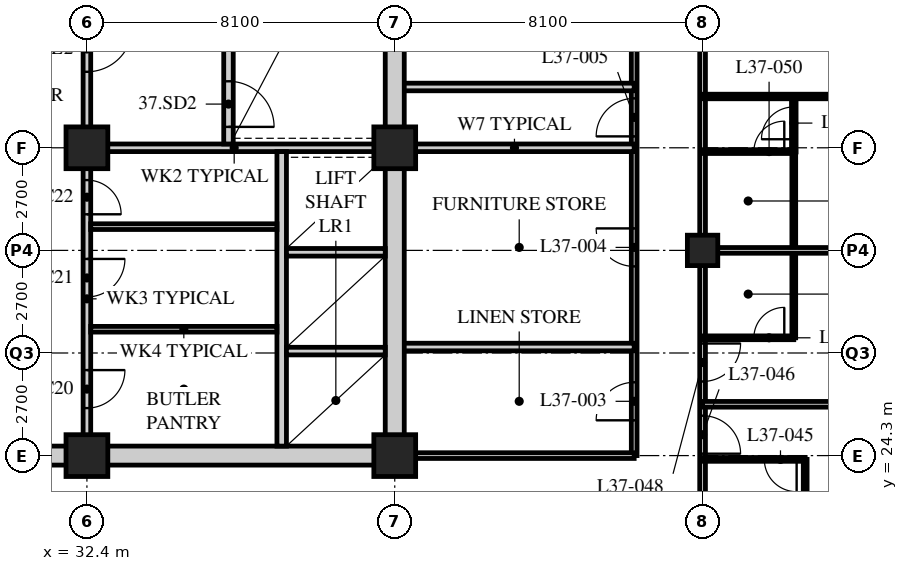
"""IFC4 building model, lengths in metres.
Left out: names, types, materials, properties, quantities, classifications, styles, units other than length and angle.
Written with IfcOpenShell. Run it as: python <this file> out.ifc"""

import sys

from ifc_helpers import new_model, si_unit, direction, frame, frame_2d, origin, origin_2d, place, context, subcontext, project, spatial, rectangle, hollow_rectangle, extrude, element, fill, save


model = new_model("IFC4")
c1 = context("Model", 3, precision=1e-05, world=origin(), true_north=direction((0.0, 1.0)))
c2 = subcontext(c1, "Body", "Model", "MODEL_VIEW")
j1 = project(units=[si_unit("LENGTHUNIT", "METRE"), si_unit("PLANEANGLEUNIT", "RADIAN")], contexts=[c1])
p1 = place(None, origin())
s1 = spatial("IfcSite", under=j1, at=p1, CompositionType="ELEMENT")
p2 = place(p1, origin())
s2 = spatial("IfcBuilding", under=s1, at=p2, CompositionType="ELEMENT")
p3 = place(p2, frame((0.0, 0.0, 144.2)))
s3 = spatial("IfcBuildingStorey", under=s2, at=p3, CompositionType="ELEMENT", Elevation=144.2)
for number, where, z_axis, x_axis in (
    (1, (32.4, 24.3, 0.0), (0.0, 0.0, 1.0), (1.0, 0.0, 0.0)),
    (2, (32.4, 32.4, 0.0), (0.0, 0.0, 1.0), (1.0, 0.0, 0.0)),
    (3, (40.5, 24.3, 0.0), (0.0, 0.0, 1.0), (1.0, 0.0, 0.0)),
    (4, (40.5, 32.4, 0.0), (0.0, 0.0, 1.0), (1.0, 0.0, 0.0)),
):
    element("IfcColumn", number, at=place(p3, frame(where, z_axis=z_axis, x_axis=x_axis)), inside=s3, PredefinedType="COLUMN", context=c2, shape_type="SweptSolid", body=[
        extrude(hollow_rectangle(XDim=1.1, YDim=1.1, WallThickness=0.1, at=origin_2d()), origin(), (0.0, 0.0, 1.0), 3.4),
    ])
p4 = place(p3, frame((48.6, 29.7, 0.0), z_axis=(0.0, 0.0, 1.0), x_axis=(1.0, 0.0, 0.0)))
e5 = element("IfcColumn", 5, at=p4, inside=s3, PredefinedType="COLUMN", context=c2, shape_type="SweptSolid", body=[
    extrude(hollow_rectangle(XDim=0.8, YDim=0.8, WallThickness=0.08, at=origin_2d()), origin(), (0.0, 0.0, 1.0), 3.4),
])
p5 = place(p3, frame((48.6, 21.6, 0.0), z_axis=(0.0, 0.0, 1.0), x_axis=(0.0, 1.0, 0.0)))
e6 = element("IfcWall", 6, at=p5, inside=s3, PredefinedType="PARTITIONING", context=c2, shape_type="SweptSolid", body=[
    extrude(rectangle(XDim=24.3, YDim=0.15, at=frame_2d((12.15, 0.0))), origin(), (0.0, 0.0, 1.0), 2.42),
])
p6 = place(p5, frame((2.75, 0.0, 0.0)))
e7 = element("IfcOpeningElement", 7, at=p6, cuts=e6, PredefinedType="OPENING", context=c2, shape_type="SweptSolid", body=[
    extrude(rectangle(XDim=1.0, YDim=2.1, at=frame_2d((0.5, 1.05))), frame((0.0, 0.085, 0.0), z_axis=(0.0, -1.0, 0.0), x_axis=(1.0, 0.0, 0.0)), (0.0, 0.0, 1.0), 0.17),
])
p7 = place(p5, frame((4.65, 0.0, 0.0)))
e8 = element("IfcOpeningElement", 8, at=p7, cuts=e6, PredefinedType="OPENING", context=c2, shape_type="SweptSolid", body=[
    extrude(rectangle(XDim=1.0, YDim=2.1, at=frame_2d((0.5, 1.05))), frame((0.0, 0.085, 0.0), z_axis=(0.0, -1.0, 0.0), x_axis=(1.0, 0.0, 0.0)), (0.0, 0.0, 1.0), 0.17),
])
p8 = place(p5, frame((13.675, 0.0, 0.0)))
e9 = element("IfcOpeningElement", 9, at=p8, cuts=e6, PredefinedType="OPENING", context=c2, shape_type="SweptSolid", body=[
    extrude(rectangle(XDim=1.0, YDim=2.1, at=frame_2d((0.5, 1.05))), frame((0.0, 0.085, 0.0), z_axis=(0.0, -1.0, 0.0), x_axis=(1.0, 0.0, 0.0)), (0.0, 0.0, 1.0), 0.17),
])
p9 = place(p5, frame((20.85, 0.0, 0.0)))
e10 = element("IfcOpeningElement", 10, at=p9, cuts=e6, PredefinedType="OPENING", context=c2, shape_type="SweptSolid", body=[
    extrude(rectangle(XDim=1.0, YDim=2.1, at=frame_2d((0.5, 1.05))), frame((0.0, 0.085, 0.0), z_axis=(0.0, -1.0, 0.0), x_axis=(1.0, 0.0, 0.0)), (0.0, 0.0, 1.0), 0.17),
])
p10 = place(p3, frame((46.8, 24.3, 0.0), z_axis=(0.0, 0.0, 1.0), x_axis=(0.0, 1.0, 0.0)))
e11 = element("IfcWall", 11, at=p10, inside=s3, PredefinedType="PARTITIONING", context=c2, shape_type="SweptSolid", body=[
    extrude(rectangle(XDim=19.8, YDim=0.15, at=frame_2d((9.9, 0.0))), origin(), (0.0, 0.0, 1.0), 3.19),
])
p11 = place(p10, frame((0.929, 0.0, 0.0)))
e12 = element("IfcOpeningElement", 12, at=p11, cuts=e11, PredefinedType="OPENING", context=c2, shape_type="SweptSolid", body=[
    extrude(rectangle(XDim=1.0, YDim=2.1, at=frame_2d((0.5, 1.05))), frame((0.0, 0.085, 0.0), z_axis=(0.0, -1.0, 0.0), x_axis=(1.0, 0.0, 0.0)), (0.0, 0.0, 1.0), 0.17),
])
p12 = place(p10, frame((4.979, 0.0, 0.0)))
e13 = element("IfcOpeningElement", 13, at=p12, cuts=e11, PredefinedType="OPENING", context=c2, shape_type="SweptSolid", body=[
    extrude(rectangle(XDim=1.0, YDim=2.1, at=frame_2d((0.5, 1.05))), frame((0.0, 0.085, 0.0), z_axis=(0.0, -1.0, 0.0), x_axis=(1.0, 0.0, 0.0)), (0.0, 0.0, 1.0), 0.17),
])
p13 = place(p10, frame((8.4, 0.0, 0.0)))
e14 = element("IfcOpeningElement", 14, at=p13, cuts=e11, PredefinedType="OPENING", context=c2, shape_type="SweptSolid", body=[
    extrude(rectangle(XDim=1.0, YDim=2.1, at=frame_2d((0.5, 1.05))), frame((0.0, 0.085, 0.0), z_axis=(0.0, -1.0, 0.0), x_axis=(1.0, 0.0, 0.0)), (0.0, 0.0, 1.0), 0.17),
])
p14 = place(p10, frame((12.45, 0.0, 0.0)))
e15 = element("IfcOpeningElement", 15, at=p14, cuts=e11, PredefinedType="OPENING", context=c2, shape_type="SweptSolid", body=[
    extrude(rectangle(XDim=1.0, YDim=2.1, at=frame_2d((0.5, 1.05))), frame((0.0, 0.085, 0.0), z_axis=(0.0, -1.0, 0.0), x_axis=(1.0, 0.0, 0.0)), (0.0, 0.0, 1.0), 0.17),
])
p15 = place(p3, frame((40.7, 24.3, 0.0), z_axis=(0.0, 0.0, 1.0), x_axis=(1.0, 0.0, 0.0)))
e16 = element("IfcWall", 16, at=p15, inside=s3, PredefinedType="PARTITIONING", context=c2, shape_type="SweptSolid", body=[
    extrude(rectangle(XDim=6.1, YDim=0.15, at=frame_2d((3.05, 0.0))), origin(), (0.0, 0.0, 1.0), 3.19),
])
for number, where, z_axis, x_axis in (
    (17, (40.5, 32.4, 0.0), (0.0, 0.0, 1.0), (1.0, 0.0, 0.0)),
    (18, (46.8, 27.157, 0.0), (0.0, 0.0, 1.0), (-1.0, 0.0, 0.0)),
    (19, (46.8, 34.0, 0.0), (0.0, 0.0, 1.0), (-1.0, 0.0, 0.0)),
):
    element("IfcWall", number, at=place(p3, frame(where, z_axis=z_axis, x_axis=x_axis)), inside=s3, PredefinedType="SOLIDWALL", context=c2, shape_type="SweptSolid", body=[
        extrude(rectangle(XDim=6.3, YDim=0.2, at=frame_2d((3.15, 0.0))), origin(), (0.0, 0.0, 1.0), 3.19),
    ])
p16 = place(p3, frame((51.3, 21.6, 0.0), z_axis=(0.0, 0.0, 1.0), x_axis=(0.0, 1.0, 0.0)))
e20 = element("IfcWall", 20, at=p16, inside=s3, PredefinedType="PARTITIONING", context=c2, shape_type="SweptSolid", body=[
    extrude(rectangle(XDim=2.6, YDim=0.1, at=frame_2d((1.3, 0.0))), origin(), (0.0, 0.0, 1.0), 3.19),
])
p17 = place(p3, frame((48.6, 24.2, 0.0), z_axis=(0.0, 0.0, 1.0), x_axis=(1.0, 0.0, 0.0)))
e21 = element("IfcWall", 21, at=p17, inside=s3, PredefinedType="PARTITIONING", context=c2, shape_type="SweptSolid", body=[
    extrude(rectangle(XDim=2.7, YDim=0.1, at=frame_2d((1.35, 0.0))), origin(), (0.0, 0.0, 1.0), 3.19),
])
p18 = place(p17, frame((1.625, 0.0, 0.0)))
e22 = element("IfcOpeningElement", 22, at=p18, cuts=e21, PredefinedType="OPENING", context=c2, shape_type="SweptSolid", body=[
    extrude(rectangle(XDim=0.85, YDim=2.1, at=frame_2d((0.425, 1.05))), frame((0.0, 0.06, 0.0), z_axis=(0.0, -1.0, 0.0), x_axis=(1.0, 0.0, 0.0)), (0.0, 0.0, 1.0), 0.12),
])
p19 = place(p3, frame((48.6, 25.65, 0.0), z_axis=(0.0, 0.0, 1.0), x_axis=(1.0, 0.0, 0.0)))
e23 = element("IfcWall", 23, at=p19, inside=s3, PredefinedType="PARTITIONING", context=c2, shape_type="SweptSolid", body=[
    extrude(rectangle(XDim=7.8, YDim=0.15, at=frame_2d((3.9, 0.0))), origin(), (0.0, 0.0, 1.0), 3.19),
])
p20 = place(p3, frame((51.0, 27.4, 0.0), z_axis=(0.0, 0.0, 1.0), x_axis=(0.0, 1.0, 0.0)))
e24 = element("IfcWall", 24, at=p20, inside=s3, PredefinedType="PARTITIONING", context=c2, shape_type="SweptSolid", body=[
    extrude(rectangle(XDim=4.9, YDim=0.1, at=frame_2d((2.45, 0.0))), origin(), (0.0, 0.0, 1.0), 3.19),
])
p21 = place(p3, frame((48.6, 27.4, 0.0), z_axis=(0.0, 0.0, 1.0), x_axis=(1.0, 0.0, 0.0)))
e25 = element("IfcWall", 25, at=p21, inside=s3, PredefinedType="PARTITIONING", context=c2, shape_type="SweptSolid", body=[
    extrude(rectangle(XDim=2.4, YDim=0.1, at=frame_2d((1.2, 0.0))), origin(), (0.0, 0.0, 1.0), 3.19),
])
p22 = place(p21, frame((1.35, 0.0, 0.0)))
e26 = element("IfcOpeningElement", 26, at=p22, cuts=e25, PredefinedType="OPENING", context=c2, shape_type="SweptSolid", body=[
    extrude(rectangle(XDim=0.8, YDim=2.1, at=frame_2d((0.4, 1.05))), frame((0.0, 0.06, 0.0), z_axis=(0.0, -1.0, 0.0), x_axis=(1.0, 0.0, 0.0)), (0.0, 0.0, 1.0), 0.12),
])
p23 = place(p3, frame((48.6, 29.7, 0.0), z_axis=(0.0, 0.0, 1.0), x_axis=(1.0, 0.0, 0.0)))
e27 = element("IfcWall", 27, at=p23, inside=s3, PredefinedType="PARTITIONING", context=c2, shape_type="SweptSolid", body=[
    extrude(rectangle(XDim=7.8, YDim=0.15, at=frame_2d((3.9, 0.0))), origin(), (0.0, 0.0, 1.0), 2.42),
])
p24 = place(p3, frame((48.6, 32.3, 0.0), z_axis=(0.0, 0.0, 1.0), x_axis=(1.0, 0.0, 0.0)))
e28 = element("IfcWall", 28, at=p24, inside=s3, PredefinedType="PARTITIONING", context=c2, shape_type="SweptSolid", body=[
    extrude(rectangle(XDim=2.4, YDim=0.1, at=frame_2d((1.2, 0.0))), origin(), (0.0, 0.0, 1.0), 3.19),
])
p25 = place(p24, frame((1.35, 0.0, 0.0)))
e29 = element("IfcOpeningElement", 29, at=p25, cuts=e28, PredefinedType="OPENING", context=c2, shape_type="SweptSolid", body=[
    extrude(rectangle(XDim=0.8, YDim=2.1, at=frame_2d((0.4, 1.05))), frame((0.0, 0.06, 0.0), z_axis=(0.0, -1.0, 0.0), x_axis=(1.0, 0.0, 0.0)), (0.0, 0.0, 1.0), 0.12),
])
p26 = place(p3, frame((48.6, 33.75, 0.0), z_axis=(0.0, 0.0, 1.0), x_axis=(1.0, 0.0, 0.0)))
e30 = element("IfcWall", 30, at=p26, inside=s3, PredefinedType="PARTITIONING", context=c2, shape_type="SweptSolid", body=[
    extrude(rectangle(XDim=7.8, YDim=0.12, at=frame_2d((3.9, 0.0))), origin(), (0.0, 0.0, 1.0), 3.19),
])
p27 = place(p26, frame((4.825, 0.0, 0.0)))
e31 = element("IfcOpeningElement", 31, at=p27, cuts=e30, PredefinedType="OPENING", context=c2, shape_type="SweptSolid", body=[
    extrude(rectangle(XDim=0.85, YDim=2.1, at=frame_2d((0.425, 1.05))), frame((0.0, 0.07, 0.0), z_axis=(0.0, -1.0, 0.0), x_axis=(1.0, 0.0, 0.0)), (0.0, 0.0, 1.0), 0.14),
])
p28 = place(p3, frame((51.0, 33.75, 0.0), z_axis=(0.0, 0.0, 1.0), x_axis=(0.0, -1.0, 0.0)))
e32 = element("IfcWall", 32, at=p28, inside=s3, PredefinedType="PARTITIONING", context=c2, shape_type="SweptSolid", body=[
    extrude(rectangle(XDim=1.46, YDim=0.12, at=frame_2d((0.73, 0.0))), origin(), (0.0, 0.0, 1.0), 3.19),
])
p29 = place(p28, frame((0.275, 0.0, 0.0)))
e33 = element("IfcOpeningElement", 33, at=p29, cuts=e32, PredefinedType="OPENING", context=c2, shape_type="SweptSolid", body=[
    extrude(rectangle(XDim=0.85, YDim=2.1, at=frame_2d((0.425, 1.05))), frame((0.0, 0.07, 0.0), z_axis=(0.0, -1.0, 0.0), x_axis=(1.0, 0.0, 0.0)), (0.0, 0.0, 1.0), 0.14),
])
p30 = place(p3, frame((15.95, 24.3, 0.0), z_axis=(0.0, 0.0, 1.0), x_axis=(1.0, 0.0, 0.0)))
e34 = element("IfcWall", 34, at=p30, inside=s3, PredefinedType="SOLIDWALL", context=c2, shape_type="SweptSolid", body=[
    extrude(rectangle(XDim=24.8, YDim=0.5, at=frame_2d((12.4, 0.0))), origin(), (0.0, 0.0, 1.0), 2.42),
])
p31 = place(p30, frame((11.5, 0.0, 0.0)))
e35 = element("IfcOpeningElement", 35, at=p31, cuts=e34, PredefinedType="OPENING", context=c2, shape_type="SweptSolid", body=[
    extrude(rectangle(XDim=1.8, YDim=2.4, at=frame_2d((0.9, 1.2))), frame((0.0, 0.26, 0.0), z_axis=(0.0, -1.0, 0.0), x_axis=(1.0, 0.0, 0.0)), (0.0, 0.0, 1.0), 0.52),
])
p32 = place(p3, frame((40.5, 24.55, 0.0), z_axis=(0.0, 0.0, 1.0), x_axis=(0.0, 1.0, 0.0)))
e36 = element("IfcWall", 36, at=p32, inside=s3, PredefinedType="SOLIDWALL", context=c2, shape_type="SweptSolid", body=[
    extrude(rectangle(XDim=15.7, YDim=0.5, at=frame_2d((7.85, 0.0))), origin(), (0.0, 0.0, 1.0), 2.42),
])
p33 = place(p3, frame((32.3, 32.4, 0.0), z_axis=(0.0, 0.0, 1.0), x_axis=(1.0, 0.0, 0.0)))
e37 = element("IfcWall", 37, at=p33, inside=s3, PredefinedType="SOLIDWALL", context=c2, shape_type="SweptSolid", body=[
    extrude(rectangle(XDim=7.95, YDim=0.2, at=frame_2d((3.975, 0.0))), origin(), (0.0, 0.0, 1.0), 2.578),
])
p34 = place(p3, frame((32.4, 32.5, 0.0), z_axis=(0.0, 0.0, 1.0), x_axis=(0.0, 1.0, 0.0)))
e38 = element("IfcWall", 38, at=p34, inside=s3, PredefinedType="SOLIDWALL", context=c2, shape_type="SweptSolid", body=[
    extrude(rectangle(XDim=7.75, YDim=0.2, at=frame_2d((3.875, 0.0))), origin(), (0.0, 0.0, 1.0), 2.578),
])
p35 = place(p34, frame((1.9, 0.0, 0.0)))
e39 = element("IfcOpeningElement", 39, at=p35, cuts=e38, PredefinedType="OPENING", context=c2, shape_type="SweptSolid", body=[
    extrude(rectangle(XDim=1.2, YDim=2.1, at=frame_2d((0.6, 1.05))), frame((0.0, 0.11, 0.0), z_axis=(0.0, -1.0, 0.0), x_axis=(1.0, 0.0, 0.0)), (0.0, 0.0, 1.0), 0.22),
])
p36 = place(p3, frame((37.525, 24.55, 0.0), z_axis=(0.0, 0.0, 1.0), x_axis=(0.0, 1.0, 0.0)))
e40 = element("IfcWall", 40, at=p36, inside=s3, PredefinedType="SOLIDWALL", context=c2, shape_type="SweptSolid", body=[
    extrude(rectangle(XDim=7.75, YDim=0.25, at=frame_2d((3.875, 0.0))), origin(), (0.0, 0.0, 1.0), 3.19),
])
for number, where, z_axis, x_axis in (
    (41, (37.65, 27.05, 0.0), (0.0, 0.0, 1.0), (1.0, 0.0, 0.0)),
    (42, (37.65, 29.65, 0.0), (0.0, 0.0, 1.0), (1.0, 0.0, 0.0)),
):
    element("IfcWall", number, at=place(p3, frame(where, z_axis=z_axis, x_axis=x_axis)), inside=s3, PredefinedType="SOLIDWALL", context=c2, shape_type="SweptSolid", body=[
        extrude(rectangle(XDim=2.6, YDim=0.2, at=frame_2d((1.3, 0.0))), origin(), (0.0, 0.0, 1.0), 3.19),
    ])
p37 = place(p3, frame((36.125, 32.5, 0.0), z_axis=(0.0, 0.0, 1.0), x_axis=(0.0, 1.0, 0.0)))
e43 = element("IfcWall", 43, at=p37, inside=s3, PredefinedType="SOLIDWALL", context=c2, shape_type="SweptSolid", body=[
    extrude(rectangle(XDim=7.75, YDim=0.25, at=frame_2d((3.875, 0.0))), origin(), (0.0, 0.0, 1.0), 3.19),
])
p38 = place(p37, frame((0.45, 0.0, 0.0)))
e44 = element("IfcOpeningElement", 44, at=p38, cuts=e43, PredefinedType="OPENING", context=c2, shape_type="SweptSolid", body=[
    extrude(rectangle(XDim=1.2, YDim=2.1, at=frame_2d((0.6, 1.05))), frame((0.0, 0.135, 0.0), z_axis=(0.0, -1.0, 0.0), x_axis=(1.0, 0.0, 0.0)), (0.0, 0.0, 1.0), 0.27),
])
p39 = place(p3, frame((32.4, 24.55, 0.0), z_axis=(0.0, 0.0, 1.0), x_axis=(0.0, 1.0, 0.0)))
e45 = element("IfcWall", 45, at=p39, inside=s3, PredefinedType="PARTITIONING", context=c2, shape_type="SweptSolid", body=[
    extrude(rectangle(XDim=7.75, YDim=0.2, at=frame_2d((3.875, 0.0))), origin(), (0.0, 0.0, 1.0), 2.578),
])
p40 = place(p39, frame((1.0, 0.0, 0.0)))
e46 = element("IfcOpeningElement", 46, at=p40, cuts=e45, PredefinedType="OPENING", context=c2, shape_type="SweptSolid", body=[
    extrude(rectangle(XDim=1.0, YDim=2.1, at=frame_2d((0.5, 1.05))), frame((0.0, 0.11, 0.0), z_axis=(0.0, -1.0, 0.0), x_axis=(1.0, 0.0, 0.0)), (0.0, 0.0, 1.0), 0.22),
])
p41 = place(p39, frame((3.925, 0.0, 0.0)))
e47 = element("IfcOpeningElement", 47, at=p41, cuts=e45, PredefinedType="OPENING", context=c2, shape_type="SweptSolid", body=[
    extrude(rectangle(XDim=1.0, YDim=2.1, at=frame_2d((0.5, 1.05))), frame((0.0, 0.11, 0.0), z_axis=(0.0, -1.0, 0.0), x_axis=(1.0, 0.0, 0.0)), (0.0, 0.0, 1.0), 0.22),
])
p42 = place(p39, frame((6.1, 0.0, 0.0)))
e48 = element("IfcOpeningElement", 48, at=p42, cuts=e45, PredefinedType="OPENING", context=c2, shape_type="SweptSolid", body=[
    extrude(rectangle(XDim=0.9, YDim=2.1, at=frame_2d((0.45, 1.05))), frame((0.0, 0.11, 0.0), z_axis=(0.0, -1.0, 0.0), x_axis=(1.0, 0.0, 0.0)), (0.0, 0.0, 1.0), 0.22),
])
for number, where, z_axis, x_axis in (
    (49, (32.5, 27.625, 0.0), (0.0, 0.0, 1.0), (1.0, 0.0, 0.0)),
    (50, (32.5, 30.325, 0.0), (0.0, 0.0, 1.0), (1.0, 0.0, 0.0)),
):
    element("IfcWall", number, at=place(p3, frame(where, z_axis=z_axis, x_axis=x_axis)), inside=s3, PredefinedType="PARTITIONING", context=c2, shape_type="SweptSolid", body=[
        extrude(rectangle(XDim=4.9, YDim=0.15, at=frame_2d((2.45, 0.0))), origin(), (0.0, 0.0, 1.0), 3.19),
    ])
p43 = place(p11, origin())
e51 = element("IfcDoor", 51, at=p43, inside=s3, OperationType="SINGLE_SWING_LEFT", PredefinedType="DOOR", context=c2, shape_type="SweptSolid", body=[
    extrude(rectangle(XDim=1.0, YDim=2.1, at=frame_2d((0.5, 1.05))), frame((0.0, 0.025, 0.0), z_axis=(0.0, -1.0, 0.0), x_axis=(1.0, 0.0, 0.0)), (0.0, 0.0, 1.0), 0.05),
])
fill(e12, e51)
p44 = place(p12, origin())
e52 = element("IfcDoor", 52, at=p44, inside=s3, OperationType="SINGLE_SWING_RIGHT", PredefinedType="DOOR", context=c2, shape_type="SweptSolid", body=[
    extrude(rectangle(XDim=1.0, YDim=2.1, at=frame_2d((0.5, 1.05))), frame((0.0, 0.025, 0.0), z_axis=(0.0, -1.0, 0.0), x_axis=(1.0, 0.0, 0.0)), (0.0, 0.0, 1.0), 0.05),
])
fill(e13, e52)
p45 = place(p13, origin())
e53 = element("IfcDoor", 53, at=p45, inside=s3, OperationType="SINGLE_SWING_LEFT", PredefinedType="DOOR", context=c2, shape_type="SweptSolid", body=[
    extrude(rectangle(XDim=1.0, YDim=2.1, at=frame_2d((0.5, 1.05))), frame((0.0, 0.025, 0.0), z_axis=(0.0, -1.0, 0.0), x_axis=(1.0, 0.0, 0.0)), (0.0, 0.0, 1.0), 0.05),
])
fill(e14, e53)
p46 = place(p18, origin())
e54 = element("IfcDoor", 54, at=p46, inside=s3, OperationType="SINGLE_SWING_LEFT", PredefinedType="DOOR", context=c2, shape_type="SweptSolid", body=[
    extrude(rectangle(XDim=0.85, YDim=2.1, at=frame_2d((0.425, 1.05))), frame((0.0, 0.025, 0.0), z_axis=(0.0, -1.0, 0.0), x_axis=(1.0, 0.0, 0.0)), (0.0, 0.0, 1.0), 0.05),
])
fill(e22, e54)
p47 = place(p6, origin())
e55 = element("IfcDoor", 55, at=p47, inside=s3, OperationType="SINGLE_SWING_RIGHT", PredefinedType="DOOR", context=c2, shape_type="SweptSolid", body=[
    extrude(rectangle(XDim=1.0, YDim=2.1, at=frame_2d((0.5, 1.05))), frame((0.0, 0.025, 0.0), z_axis=(0.0, -1.0, 0.0), x_axis=(1.0, 0.0, 0.0)), (0.0, 0.0, 1.0), 0.05),
])
fill(e7, e55)
p48 = place(p22, origin())
e56 = element("IfcDoor", 56, at=p48, inside=s3, OperationType="SINGLE_SWING_RIGHT", PredefinedType="DOOR", context=c2, shape_type="SweptSolid", body=[
    extrude(rectangle(XDim=0.8, YDim=2.1, at=frame_2d((0.4, 1.05))), frame((0.0, 0.025, 0.0), z_axis=(0.0, -1.0, 0.0), x_axis=(1.0, 0.0, 0.0)), (0.0, 0.0, 1.0), 0.05),
])
fill(e26, e56)
p49 = place(p7, origin())
e57 = element("IfcDoor", 57, at=p49, inside=s3, OperationType="SINGLE_SWING_LEFT", PredefinedType="DOOR", context=c2, shape_type="SweptSolid", body=[
    extrude(rectangle(XDim=1.0, YDim=2.1, at=frame_2d((0.5, 1.05))), frame((0.0, 0.025, 0.0), z_axis=(0.0, -1.0, 0.0), x_axis=(1.0, 0.0, 0.0)), (0.0, 0.0, 1.0), 0.05),
])
fill(e8, e57)
p50 = place(p25, origin())
e58 = element("IfcDoor", 58, at=p50, inside=s3, OperationType="SINGLE_SWING_RIGHT", PredefinedType="DOOR", context=c2, shape_type="SweptSolid", body=[
    extrude(rectangle(XDim=0.8, YDim=2.1, at=frame_2d((0.4, 1.05))), frame((0.0, 0.025, 0.0), z_axis=(0.0, -1.0, 0.0), x_axis=(1.0, 0.0, 0.0)), (0.0, 0.0, 1.0), 0.05),
])
fill(e29, e58)
p51 = place(p29, origin())
e59 = element("IfcDoor", 59, at=p51, inside=s3, OperationType="SINGLE_SWING_LEFT", PredefinedType="DOOR", context=c2, shape_type="SweptSolid", body=[
    extrude(rectangle(XDim=0.85, YDim=2.1, at=frame_2d((0.425, 1.05))), frame((0.0, 0.025, 0.0), z_axis=(0.0, -1.0, 0.0), x_axis=(1.0, 0.0, 0.0)), (0.0, 0.0, 1.0), 0.05),
])
fill(e33, e59)
p52 = place(p40, origin())
e60 = element("IfcDoor", 60, at=p52, inside=s3, OperationType="SINGLE_SWING_LEFT", PredefinedType="DOOR", context=c2, shape_type="SweptSolid", body=[
    extrude(rectangle(XDim=1.0, YDim=2.1, at=frame_2d((0.5, 1.05))), frame((0.0, 0.025, 0.0), z_axis=(0.0, -1.0, 0.0), x_axis=(1.0, 0.0, 0.0)), (0.0, 0.0, 1.0), 0.05),
])
fill(e46, e60)
p53 = place(p41, origin())
e61 = element("IfcDoor", 61, at=p53, inside=s3, OperationType="SINGLE_SWING_LEFT", PredefinedType="DOOR", context=c2, shape_type="SweptSolid", body=[
    extrude(rectangle(XDim=1.0, YDim=2.1, at=frame_2d((0.5, 1.05))), frame((0.0, 0.025, 0.0), z_axis=(0.0, -1.0, 0.0), x_axis=(1.0, 0.0, 0.0)), (0.0, 0.0, 1.0), 0.05),
])
fill(e47, e61)
p54 = place(p42, origin())
e62 = element("IfcDoor", 62, at=p54, inside=s3, OperationType="SINGLE_SWING_RIGHT", PredefinedType="DOOR", context=c2, shape_type="SweptSolid", body=[
    extrude(rectangle(XDim=0.9, YDim=2.1, at=frame_2d((0.45, 1.05))), frame((0.0, 0.025, 0.0), z_axis=(0.0, -1.0, 0.0), x_axis=(1.0, 0.0, 0.0)), (0.0, 0.0, 1.0), 0.05),
])
fill(e48, e62)
p55 = place(p38, origin())
e63 = element("IfcDoor", 63, at=p55, inside=s3, OperationType="SINGLE_SWING_RIGHT", PredefinedType="DOOR", context=c2, shape_type="SweptSolid", body=[
    extrude(rectangle(XDim=1.2, YDim=2.1, at=frame_2d((0.6, 1.05))), frame((0.0, 0.025, 0.0), z_axis=(0.0, -1.0, 0.0), x_axis=(1.0, 0.0, 0.0)), (0.0, 0.0, 1.0), 0.05),
])
fill(e44, e63)
p56 = place(p35, origin())
e64 = element("IfcDoor", 64, at=p56, inside=s3, OperationType="SINGLE_SWING_LEFT", PredefinedType="DOOR", context=c2, shape_type="SweptSolid", body=[
    extrude(rectangle(XDim=1.2, YDim=2.1, at=frame_2d((0.6, 1.05))), frame((0.0, 0.025, 0.0), z_axis=(0.0, -1.0, 0.0), x_axis=(1.0, 0.0, 0.0)), (0.0, 0.0, 1.0), 0.05),
])
fill(e39, e64)
save(model, sys.argv[1])
